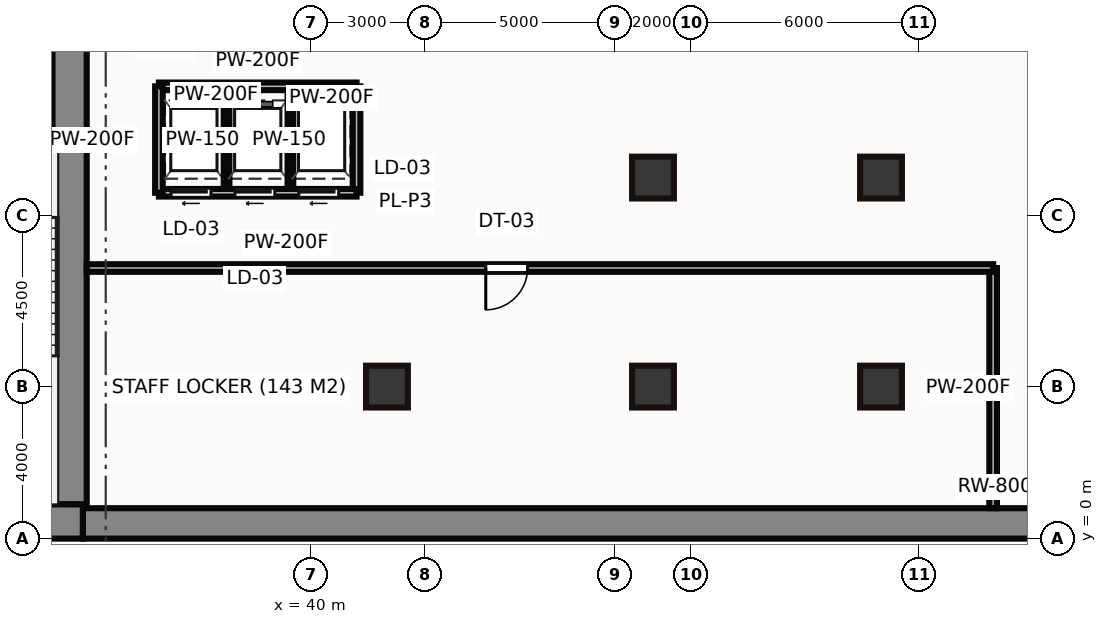
"""IFC4 building model, lengths in metres.
Left out: names, types, materials, properties, quantities, classifications, styles, units other than length and angle.
Written with IfcOpenShell. Run it as: python <this file> out.ifc"""

import sys

from ifc_helpers import new_model, si_unit, direction, frame, frame_2d, origin, origin_2d, place, context, subcontext, project, spatial, rectangle, hollow_rectangle, extrude, source, transform, mapped, element, fill, save


model = new_model("IFC4")
c1 = context("Model", 3, precision=1e-05, world=origin(), true_north=direction((0.0, 1.0)))
c2 = subcontext(c1, "Body", "Model", "MODEL_VIEW")
j1 = project(units=[si_unit("LENGTHUNIT", "METRE"), si_unit("PLANEANGLEUNIT", "RADIAN")], contexts=[c1])
p1 = place(None, origin())
s1 = spatial("IfcSite", under=j1, at=p1, CompositionType="ELEMENT")
p2 = place(p1, origin())
s2 = spatial("IfcBuilding", under=s1, at=p2, CompositionType="ELEMENT")
p3 = place(p2, frame((0.0, 0.0, -5.0)))
s3 = spatial("IfcBuildingStorey", under=s2, at=p3, CompositionType="ELEMENT", Elevation=-5.0)
m1 = source(origin(), c2, "Body", "SweptSolid", [
    extrude(rectangle(XDim=48.0, YDim=0.8, at=frame_2d((24.0, 0.0))), origin(), (0.0, 0.0, 1.0), 5.0),
])
p4 = place(p3, frame((34.0, 0.4, 0.0), z_axis=(0.0, 0.0, 1.0), x_axis=(1.0, 0.0, 0.0)))
e1 = element("IfcWall", 1, at=p4, inside=s3, PredefinedType="USERDEFINED", context=c2, shape_type="MappedRepresentation", body=[
    mapped(m1, transform((0.0, 0.0, 0.0))),
])
m2 = source(origin(), c2, "Body", "SweptSolid", [
    extrude(rectangle(XDim=29.5, YDim=0.9, at=frame_2d((14.75, 0.0))), origin(), (0.0, 0.0, 1.0), 5.0),
])
p5 = place(p3, frame((4.5, 0.45, 0.0), z_axis=(0.0, 0.0, 1.0), x_axis=(1.0, 0.0, 0.0)))
e2 = element("IfcWall", 2, at=p5, inside=s3, PredefinedType="SHEAR", context=c2, shape_type="MappedRepresentation", body=[
    mapped(m2, transform((0.0, 0.0, 0.0))),
])
m3 = source(origin(), c2, "Body", "SweptSolid", [
    extrude(rectangle(XDim=13.1, YDim=0.9, at=frame_2d((6.55, 0.0))), origin(), (0.0, 0.0, 1.0), 5.0),
])
p6 = place(p3, frame((33.65, 0.9, 0.0), z_axis=(0.0, 0.0, 1.0), x_axis=(0.0, 1.0, 0.0)))
e3 = element("IfcWall", 3, at=p6, inside=s3, PredefinedType="SHEAR", context=c2, shape_type="MappedRepresentation", body=[
    mapped(m3, transform((0.0, 0.0, 0.0))),
])
m4 = source(origin(), c2, "Body", "SweptSolid", [
    extrude(rectangle(XDim=3.39, YDim=0.45, at=frame_2d((1.695, 0.0))), origin(), (0.0, 0.0, 1.0), 5.0),
])
p7 = place(p3, frame((29.86, 10.42, 0.0), z_axis=(0.0, 0.0, 1.0), x_axis=(1.0, 0.0, 0.0)))
e4 = element("IfcWall", 4, at=p7, inside=s3, PredefinedType="SHEAR", context=c2, shape_type="MappedRepresentation", body=[
    mapped(m4, transform((0.0, 0.0, 0.0))),
])
p8 = place(p7, frame((1.1, 0.0, 0.0)))
e5 = element("IfcOpeningElement", 5, at=p8, cuts=e4, PredefinedType="OPENING", context=c2, shape_type="SweptSolid", body=[
    extrude(rectangle(XDim=1.1, YDim=2.15, at=frame_2d((0.55, 1.075))), frame((0.0, 0.235, 0.0), z_axis=(0.0, -1.0, 0.0), x_axis=(1.0, 0.0, 0.0)), (0.0, 0.0, 1.0), 0.47),
])
m5 = source(origin(), c2, "Body", "SweptSolid", [
    extrude(hollow_rectangle(XDim=1.1, YDim=1.1, WallThickness=0.05, at=origin_2d()), origin(), (0.0, 0.0, 1.0), 5.0),
])
for number, where, z_axis, x_axis in (
    (6, (49.0, 9.5, 0.0), (0.0, 0.0, 1.0), (1.0, 0.0, 0.0)),
    (7, (55.0, 9.5, 0.0), (0.0, 0.0, 1.0), (1.0, 0.0, 0.0)),
    (8, (42.0, 4.0, 0.0), (0.0, 0.0, 1.0), (1.0, 0.0, 0.0)),
    (9, (49.0, 4.0, 0.0), (0.0, 0.0, 1.0), (1.0, 0.0, 0.0)),
    (10, (55.0, 4.0, 0.0), (0.0, 0.0, 1.0), (1.0, 0.0, 0.0)),
):
    element("IfcColumn", number, at=place(p3, frame(where, z_axis=z_axis, x_axis=x_axis)), inside=s3, PredefinedType="PILASTER", context=c2, shape_type="MappedRepresentation", body=[
        mapped(m5, transform((0.0, 0.0, 0.0))),
    ])
m6 = source(origin(), c2, "Body", "SweptSolid", [
    extrude(rectangle(XDim=5.2, YDim=0.2, at=frame_2d((2.6, 0.0))), origin(), (0.0, 0.0, 1.0), 4.7),
])
p9 = place(p3, frame((36.0, 9.1, 0.0), z_axis=(0.0, 0.0, 1.0), x_axis=(1.0, 0.0, 0.0)))
e11 = element("IfcWall", 11, at=p9, inside=s3, PredefinedType="PARTITIONING", context=c2, shape_type="MappedRepresentation", body=[
    mapped(m6, transform((0.0, 0.0, 0.0))),
])
p10 = place(p9, frame((0.32, 0.0, 0.0)))
e12 = element("IfcOpeningElement", 12, at=p10, cuts=e11, PredefinedType="OPENING", context=c2, shape_type="SweptSolid", body=[
    extrude(rectangle(XDim=1.05, YDim=2.15, at=frame_2d((0.525, 1.075))), frame((0.0, 0.11, 0.0), z_axis=(0.0, -1.0, 0.0), x_axis=(1.0, 0.0, 0.0)), (0.0, 0.0, 1.0), 0.22),
])
p11 = place(p9, frame((2.0, 0.0, 0.0)))
e13 = element("IfcOpeningElement", 13, at=p11, cuts=e11, PredefinedType="OPENING", context=c2, shape_type="SweptSolid", body=[
    extrude(rectangle(XDim=1.05, YDim=2.15, at=frame_2d((0.525, 1.075))), frame((0.0, 0.11, 0.0), z_axis=(0.0, -1.0, 0.0), x_axis=(1.0, 0.0, 0.0)), (0.0, 0.0, 1.0), 0.22),
])
p12 = place(p9, frame((3.68, 0.0, 0.0)))
e14 = element("IfcOpeningElement", 14, at=p12, cuts=e11, PredefinedType="OPENING", context=c2, shape_type="SweptSolid", body=[
    extrude(rectangle(XDim=1.05, YDim=2.15, at=frame_2d((0.525, 1.075))), frame((0.0, 0.11, 0.0), z_axis=(0.0, -1.0, 0.0), x_axis=(1.0, 0.0, 0.0)), (0.0, 0.0, 1.0), 0.22),
])
p13 = place(p3, frame((36.0, 11.9, 0.0), z_axis=(0.0, 0.0, 1.0), x_axis=(1.0, 0.0, 0.0)))
e15 = element("IfcWall", 15, at=p13, inside=s3, PredefinedType="PARTITIONING", context=c2, shape_type="MappedRepresentation", body=[
    mapped(m6, transform((0.0, 0.0, 0.0))),
])
m7 = source(origin(), c2, "Body", "SweptSolid", [
    extrude(rectangle(XDim=2.8, YDim=0.2, at=frame_2d((1.4, 0.0))), origin(), (0.0, 0.0, 1.0), 4.7),
])
for number, where, z_axis, x_axis in (
    (16, (36.0, 9.1, 0.0), (0.0, 0.0, 1.0), (0.0, 1.0, 0.0)),
    (17, (41.2, 9.1, 0.0), (0.0, 0.0, 1.0), (0.0, 1.0, 0.0)),
):
    element("IfcWall", number, at=place(p3, frame(where, z_axis=z_axis, x_axis=x_axis)), inside=s3, PredefinedType="PARTITIONING", context=c2, shape_type="MappedRepresentation", body=[
        mapped(m7, transform((0.0, 0.0, 0.0))),
    ])
m8 = source(origin(), c2, "Body", "SweptSolid", [
    extrude(rectangle(XDim=2.7, YDim=0.15, at=frame_2d((1.35, 0.0))), origin(), (0.0, 0.0, 1.0), 4.7),
])
for number, where, z_axis, x_axis in (
    (18, (37.78, 9.15, 0.0), (0.0, 0.0, 1.0), (0.0, 1.0, 0.0)),
    (19, (39.46, 9.15, 0.0), (0.0, 0.0, 1.0), (0.0, 1.0, 0.0)),
):
    element("IfcWall", number, at=place(p3, frame(where, z_axis=z_axis, x_axis=x_axis)), inside=s3, PredefinedType="PARTITIONING", context=c2, shape_type="MappedRepresentation", body=[
        mapped(m8, transform((0.0, 0.0, 0.0))),
    ])
m9 = source(origin(), c2, "Body", "SweptSolid", [
    extrude(rectangle(XDim=23.85, YDim=0.2, at=frame_2d((11.925, 0.0))), origin(), (0.0, 0.0, 1.0), 4.7),
])
p14 = place(p3, frame((34.1, 7.12, 0.0), z_axis=(0.0, 0.0, 1.0), x_axis=(1.0, 0.0, 0.0)))
e20 = element("IfcWall", 20, at=p14, inside=s3, PredefinedType="PARTITIONING", context=c2, shape_type="MappedRepresentation", body=[
    mapped(m9, transform((0.0, 0.0, 0.0))),
])
p15 = place(p14, frame((10.5, 0.0, 0.0)))
e21 = element("IfcOpeningElement", 21, at=p15, cuts=e20, PredefinedType="OPENING", context=c2, shape_type="SweptSolid", body=[
    extrude(rectangle(XDim=1.1, YDim=2.15, at=frame_2d((0.55, 1.075))), frame((0.0, 0.11, 0.0), z_axis=(0.0, -1.0, 0.0), x_axis=(1.0, 0.0, 0.0)), (0.0, 0.0, 1.0), 0.22),
])
m10 = source(origin(), c2, "Body", "SweptSolid", [
    extrude(rectangle(XDim=6.32, YDim=0.2, at=frame_2d((3.16, 0.0))), origin(), (0.0, 0.0, 1.0), 4.7),
])
p16 = place(p3, frame((57.95, 0.8, 0.0), z_axis=(0.0, 0.0, 1.0), x_axis=(0.0, 1.0, 0.0)))
e22 = element("IfcWall", 22, at=p16, inside=s3, PredefinedType="PARTITIONING", context=c2, shape_type="MappedRepresentation", body=[
    mapped(m10, transform((0.0, 0.0, 0.0))),
])
m11 = source(origin(), c2, "Body", "SweptSolid", [
    extrude(rectangle(XDim=1.05, YDim=2.15, at=frame_2d((0.525, 1.075))), frame((0.0, 0.025, 0.0), z_axis=(0.0, -1.0, 0.0), x_axis=(1.0, 0.0, 0.0)), (0.0, 0.0, 1.0), 0.05),
])
p17 = place(p10, frame((1.05, 0.0, 0.0), z_axis=(0.0, 0.0, 1.0), x_axis=(-1.0, 0.0, 0.0)))
e23 = element("IfcDoor", 23, at=p17, inside=s3, OperationType="SLIDING_TO_LEFT", PredefinedType="DOOR", context=c2, shape_type="MappedRepresentation", body=[
    mapped(m11, transform((0.0, 0.0, 0.0))),
])
fill(e12, e23)
p18 = place(p11, frame((1.05, 0.0, 0.0), z_axis=(0.0, 0.0, 1.0), x_axis=(-1.0, 0.0, 0.0)))
e24 = element("IfcDoor", 24, at=p18, inside=s3, OperationType="SLIDING_TO_LEFT", PredefinedType="DOOR", context=c2, shape_type="MappedRepresentation", body=[
    mapped(m11, transform((0.0, 0.0, 0.0))),
])
fill(e13, e24)
p19 = place(p12, frame((1.05, 0.0, 0.0), z_axis=(0.0, 0.0, 1.0), x_axis=(-1.0, 0.0, 0.0)))
e25 = element("IfcDoor", 25, at=p19, inside=s3, OperationType="SLIDING_TO_LEFT", PredefinedType="DOOR", context=c2, shape_type="MappedRepresentation", body=[
    mapped(m11, transform((0.0, 0.0, 0.0))),
])
fill(e14, e25)
m12 = source(origin(), c2, "Body", "SweptSolid", [
    extrude(rectangle(XDim=1.1, YDim=2.15, at=frame_2d((0.55, 1.075))), frame((0.0, 0.025, 0.0), z_axis=(0.0, -1.0, 0.0), x_axis=(1.0, 0.0, 0.0)), (0.0, 0.0, 1.0), 0.05),
])
p20 = place(p15, frame((1.1, 0.0, 0.0), z_axis=(0.0, 0.0, 1.0), x_axis=(-1.0, 0.0, 0.0)))
e26 = element("IfcDoor", 26, at=p20, inside=s3, OperationType="SINGLE_SWING_LEFT", PredefinedType="DOOR", context=c2, shape_type="MappedRepresentation", body=[
    mapped(m12, transform((0.0, 0.0, 0.0))),
])
fill(e21, e26)
save(model, sys.argv[1])
